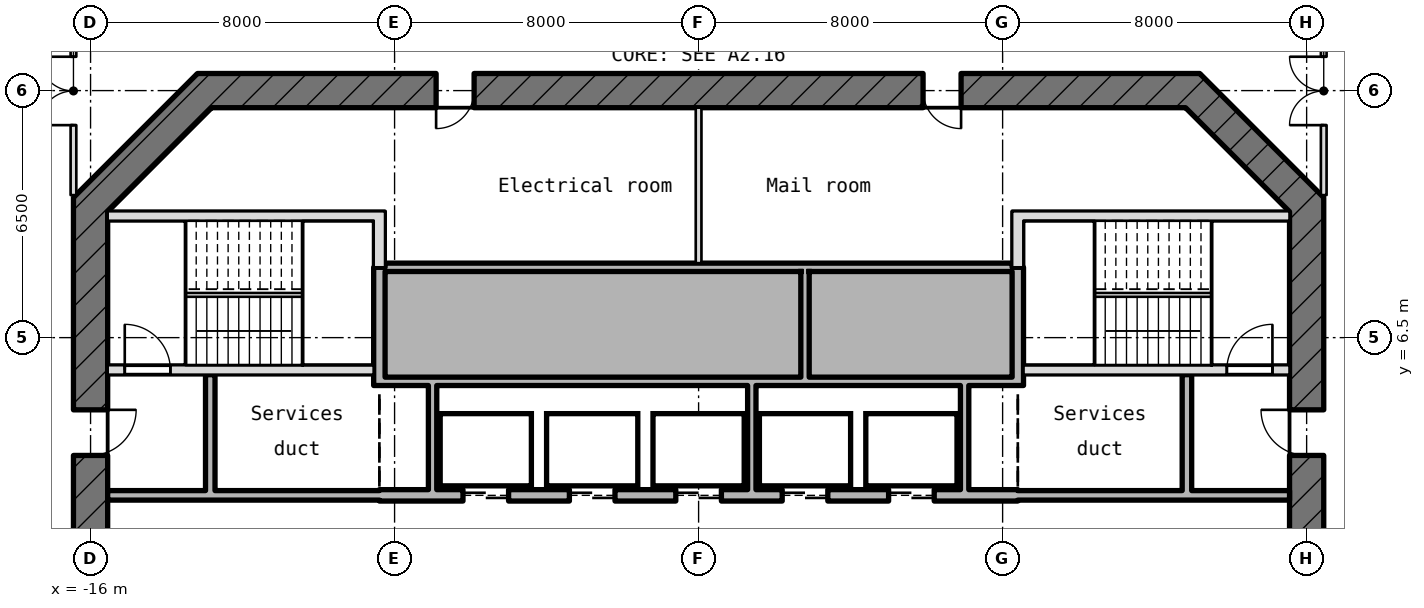
"""IFC4 building model, lengths in metres.
Left out: names, types, materials, properties, quantities, classifications, styles, units other than length and angle.
Written with IfcOpenShell. Run it as: python <this file> out.ifc"""

import sys

from ifc_helpers import new_model, si_unit, direction, frame, frame_2d, origin, place, context, subcontext, project, spatial, rectangle, extrude, element, fill, save


model = new_model("IFC4")
c1 = context("Model", 3, precision=1e-05, world=origin(), true_north=direction((0.0, 1.0)))
c2 = subcontext(c1, "Body", "Model", "MODEL_VIEW")
j1 = project(units=[si_unit("LENGTHUNIT", "METRE"), si_unit("PLANEANGLEUNIT", "RADIAN")], contexts=[c1])
p1 = place(None, origin())
s1 = spatial("IfcSite", under=j1, at=p1, CompositionType="ELEMENT")
p2 = place(p1, origin())
s2 = spatial("IfcBuilding", under=s1, at=p2, CompositionType="ELEMENT")
p3 = place(p2, frame((0.0, 0.0, 161.05)))
s3 = spatial("IfcBuildingStorey", under=s2, at=p3, CompositionType="ELEMENT", Elevation=161.05)
p4 = place(p3, frame((16.0, -10.186, -0.18), z_axis=(0.0, 0.0, 1.0), x_axis=(0.0, 1.0, 0.0)))
e1 = element("IfcWall", 1, at=p4, inside=s3, PredefinedType="SHEAR", context=c2, shape_type="SweptSolid", body=[
    extrude(rectangle(XDim=20.373, YDim=0.9, at=frame_2d((10.186, 0.0))), origin(), (0.0, 0.0, 1.0), 4.15),
])
p5 = place(p4, frame((8.986, 0.0, 0.18)))
e2 = element("IfcOpeningElement", 2, at=p5, cuts=e1, PredefinedType="OPENING", context=c2, shape_type="SweptSolid", body=[
    extrude(rectangle(XDim=2.4, YDim=2.1, at=frame_2d((1.2, 1.05))), frame((0.0, 0.46, 0.0), z_axis=(0.0, -1.0, 0.0), x_axis=(1.0, 0.0, 0.0)), (0.0, 0.0, 1.0), 0.92),
])
p6 = place(p4, frame((13.586, 0.0, 0.18)))
e3 = element("IfcOpeningElement", 3, at=p6, cuts=e1, PredefinedType="OPENING", context=c2, shape_type="SweptSolid", body=[
    extrude(rectangle(XDim=1.2, YDim=2.1, at=frame_2d((0.6, 1.05))), frame((0.0, 0.46, 0.0), z_axis=(0.0, -1.0, 0.0), x_axis=(1.0, 0.0, 0.0)), (0.0, 0.0, 1.0), 0.92),
])
p7 = place(p3, frame((16.132, 9.868, -0.18), z_axis=(0.0, 0.0, 1.0), x_axis=(-0.707106781187, 0.707106781187, 0.0)))
e4 = element("IfcWall", 4, at=p7, inside=s3, PredefinedType="SHEAR", context=c2, shape_type="SweptSolid", body=[
    extrude(rectangle(XDim=4.615, YDim=0.9, at=frame_2d((2.308, 0.0))), origin(), (0.0, 0.0, 1.0), 4.15),
])
p8 = place(p3, frame((13.186, 13.0, -0.18), z_axis=(0.0, 0.0, 1.0), x_axis=(-1.0, 0.0, 0.0)))
e5 = element("IfcWall", 5, at=p8, inside=s3, PredefinedType="SHEAR", context=c2, shape_type="SweptSolid", body=[
    extrude(rectangle(XDim=26.373, YDim=0.9, at=frame_2d((13.186, 0.0))), origin(), (0.0, 0.0, 1.0), 4.15),
])
p9 = place(p8, frame((19.094, 0.0, 0.18)))
e6 = element("IfcOpeningElement", 6, at=p9, cuts=e5, PredefinedType="OPENING", context=c2, shape_type="SweptSolid", body=[
    extrude(rectangle(XDim=1.0, YDim=2.1, at=frame_2d((0.5, 1.05))), frame((0.0, 0.46, 0.0), z_axis=(0.0, -1.0, 0.0), x_axis=(1.0, 0.0, 0.0)), (0.0, 0.0, 1.0), 0.92),
])
p10 = place(p8, frame((6.279, 0.0, 0.18)))
e7 = element("IfcOpeningElement", 7, at=p10, cuts=e5, PredefinedType="OPENING", context=c2, shape_type="SweptSolid", body=[
    extrude(rectangle(XDim=1.0, YDim=2.1, at=frame_2d((0.5, 1.05))), frame((0.0, 0.46, 0.0), z_axis=(0.0, -1.0, 0.0), x_axis=(1.0, 0.0, 0.0)), (0.0, 0.0, 1.0), 0.92),
])
p11 = place(p3, frame((-12.868, 13.132, -0.18), z_axis=(0.0, 0.0, 1.0), x_axis=(-0.707106781187, -0.707106781187, 0.0)))
e8 = element("IfcWall", 8, at=p11, inside=s3, PredefinedType="SHEAR", context=c2, shape_type="SweptSolid", body=[
    extrude(rectangle(XDim=4.615, YDim=0.9, at=frame_2d((2.308, 0.0))), origin(), (0.0, 0.0, 1.0), 4.15),
])
p12 = place(p3, frame((-16.0, 10.186, -0.18), z_axis=(0.0, 0.0, 1.0), x_axis=(0.0, -1.0, 0.0)))
e9 = element("IfcWall", 9, at=p12, inside=s3, PredefinedType="SHEAR", context=c2, shape_type="SweptSolid", body=[
    extrude(rectangle(XDim=20.373, YDim=0.9, at=frame_2d((10.186, 0.0))), origin(), (0.0, 0.0, 1.0), 4.15),
])
p13 = place(p12, frame((8.986, 0.0, 0.18)))
e10 = element("IfcOpeningElement", 10, at=p13, cuts=e9, PredefinedType="OPENING", context=c2, shape_type="SweptSolid", body=[
    extrude(rectangle(XDim=2.4, YDim=2.1, at=frame_2d((1.2, 1.05))), frame((0.0, 0.46, 0.0), z_axis=(0.0, -1.0, 0.0), x_axis=(1.0, 0.0, 0.0)), (0.0, 0.0, 1.0), 0.92),
])
p14 = place(p12, frame((5.586, 0.0, 0.18)))
e11 = element("IfcOpeningElement", 11, at=p14, cuts=e9, PredefinedType="OPENING", context=c2, shape_type="SweptSolid", body=[
    extrude(rectangle(XDim=1.2, YDim=2.1, at=frame_2d((0.6, 1.05))), frame((0.0, 0.46, 0.0), z_axis=(0.0, -1.0, 0.0), x_axis=(1.0, 0.0, 0.0)), (0.0, 0.0, 1.0), 0.92),
])
p15 = place(p3, frame((-15.55, 2.35, 0.0), z_axis=(0.0, 0.0, 1.0), x_axis=(1.0, 0.0, 0.0)))
e12 = element("IfcWall", 12, at=p15, inside=s3, PredefinedType="STANDARD", context=c2, shape_type="SweptSolid", body=[
    extrude(rectangle(XDim=7.15, YDim=0.25, at=frame_2d((3.575, 0.0))), origin(), (0.0, 0.0, 1.0), 3.97),
])
p16 = place(p3, frame((-8.4, 2.35, -0.18), z_axis=(0.0, 0.0, 1.0), x_axis=(1.0, 0.0, 0.0)))
e13 = element("IfcWall", 13, at=p16, inside=s3, PredefinedType="SHEAR", context=c2, shape_type="SweptSolid", body=[
    extrude(rectangle(XDim=16.8, YDim=0.3, at=frame_2d((8.4, 0.0))), origin(), (0.0, 0.0, 1.0), 4.15),
])
p17 = place(p16, frame((2.2, 0.0, 0.18)))
e14 = element("IfcOpeningElement", 14, at=p17, cuts=e13, PredefinedType="OPENING", context=c2, shape_type="SweptSolid", body=[
    extrude(rectangle(XDim=1.2, YDim=2.1, at=frame_2d((0.6, 1.05))), frame((0.0, 0.16, 0.0), z_axis=(0.0, -1.0, 0.0), x_axis=(1.0, 0.0, 0.0)), (0.0, 0.0, 1.0), 0.32),
])
p18 = place(p16, frame((5.0, 0.0, 0.18)))
e15 = element("IfcOpeningElement", 15, at=p18, cuts=e13, PredefinedType="OPENING", context=c2, shape_type="SweptSolid", body=[
    extrude(rectangle(XDim=1.2, YDim=2.1, at=frame_2d((0.6, 1.05))), frame((0.0, 0.16, 0.0), z_axis=(0.0, -1.0, 0.0), x_axis=(1.0, 0.0, 0.0)), (0.0, 0.0, 1.0), 0.32),
])
p19 = place(p16, frame((7.8, 0.0, 0.18)))
e16 = element("IfcOpeningElement", 16, at=p19, cuts=e13, PredefinedType="OPENING", context=c2, shape_type="SweptSolid", body=[
    extrude(rectangle(XDim=1.2, YDim=2.1, at=frame_2d((0.6, 1.05))), frame((0.0, 0.16, 0.0), z_axis=(0.0, -1.0, 0.0), x_axis=(1.0, 0.0, 0.0)), (0.0, 0.0, 1.0), 0.32),
])
p20 = place(p16, frame((10.6, 0.0, 0.18)))
e17 = element("IfcOpeningElement", 17, at=p20, cuts=e13, PredefinedType="OPENING", context=c2, shape_type="SweptSolid", body=[
    extrude(rectangle(XDim=1.2, YDim=2.1, at=frame_2d((0.6, 1.05))), frame((0.0, 0.16, 0.0), z_axis=(0.0, -1.0, 0.0), x_axis=(1.0, 0.0, 0.0)), (0.0, 0.0, 1.0), 0.32),
])
p21 = place(p16, frame((13.4, 0.0, 0.18)))
e18 = element("IfcOpeningElement", 18, at=p21, cuts=e13, PredefinedType="OPENING", context=c2, shape_type="SweptSolid", body=[
    extrude(rectangle(XDim=1.2, YDim=2.1, at=frame_2d((0.6, 1.05))), frame((0.0, 0.16, 0.0), z_axis=(0.0, -1.0, 0.0), x_axis=(1.0, 0.0, 0.0)), (0.0, 0.0, 1.0), 0.32),
])
p22 = place(p3, frame((8.4, 2.35, 0.0), z_axis=(0.0, 0.0, 1.0), x_axis=(1.0, 0.0, 0.0)))
e19 = element("IfcWall", 19, at=p22, inside=s3, PredefinedType="STANDARD", context=c2, shape_type="SweptSolid", body=[
    extrude(rectangle(XDim=7.15, YDim=0.25, at=frame_2d((3.575, 0.0))), origin(), (0.0, 0.0, 1.0), 3.97),
])
p23 = place(p3, frame((-8.25, 5.35, 0.0), z_axis=(0.0, 0.0, 1.0), x_axis=(1.0, 0.0, 0.0)))
e20 = element("IfcWall", 20, at=p23, inside=s3, PredefinedType="STANDARD", context=c2, shape_type="SweptSolid", body=[
    extrude(rectangle(XDim=16.5, YDim=0.22, at=frame_2d((8.25, 0.0))), origin(), (0.0, 0.0, 1.0), 3.97),
])
p24 = place(p3, frame((-15.55, 5.65, -0.18), z_axis=(0.0, 0.0, 1.0), x_axis=(1.0, 0.0, 0.0)))
e21 = element("IfcWall", 21, at=p24, inside=s3, PredefinedType="SHEAR", context=c2, shape_type="SweptSolid", body=[
    extrude(rectangle(XDim=7.0, YDim=0.25, at=frame_2d((3.5, 0.0))), origin(), (0.0, 0.0, 1.0), 4.15),
])
p25 = place(p24, frame((0.45, 0.0, 0.18)))
e22 = element("IfcOpeningElement", 22, at=p25, cuts=e21, PredefinedType="OPENING", context=c2, shape_type="SweptSolid", body=[
    extrude(rectangle(XDim=1.2, YDim=2.1, at=frame_2d((0.6, 1.05))), frame((0.0, 0.135, 0.0), z_axis=(0.0, -1.0, 0.0), x_axis=(1.0, 0.0, 0.0)), (0.0, 0.0, 1.0), 0.27),
])
p26 = place(p3, frame((8.55, 5.65, -0.18), z_axis=(0.0, 0.0, 1.0), x_axis=(1.0, 0.0, 0.0)))
e23 = element("IfcWall", 23, at=p26, inside=s3, PredefinedType="SHEAR", context=c2, shape_type="SweptSolid", body=[
    extrude(rectangle(XDim=7.0, YDim=0.25, at=frame_2d((3.5, 0.0))), origin(), (0.0, 0.0, 1.0), 4.15),
])
p27 = place(p26, frame((5.35, 0.0, 0.18)))
e24 = element("IfcOpeningElement", 24, at=p27, cuts=e23, PredefinedType="OPENING", context=c2, shape_type="SweptSolid", body=[
    extrude(rectangle(XDim=1.2, YDim=2.1, at=frame_2d((0.6, 1.05))), frame((0.0, 0.135, 0.0), z_axis=(0.0, -1.0, 0.0), x_axis=(1.0, 0.0, 0.0)), (0.0, 0.0, 1.0), 0.27),
])
p28 = place(p3, frame((-8.25, 8.35, 0.0), z_axis=(0.0, 0.0, 1.0), x_axis=(1.0, 0.0, 0.0)))
e25 = element("IfcWall", 25, at=p28, inside=s3, PredefinedType="STANDARD", context=c2, shape_type="SweptSolid", body=[
    extrude(rectangle(XDim=16.5, YDim=0.22, at=frame_2d((8.25, 0.0))), origin(), (0.0, 0.0, 1.0), 3.97),
])
for number, where, z_axis, x_axis in (
    (26, (-15.55, 9.7, -0.18), (0.0, 0.0, 1.0), (1.0, 0.0, 0.0)),
    (27, (8.55, 9.7, -0.18), (0.0, 0.0, 1.0), (1.0, 0.0, 0.0)),
):
    element("IfcWall", number, at=place(p3, frame(where, z_axis=z_axis, x_axis=x_axis)), inside=s3, PredefinedType="SHEAR", context=c2, shape_type="SweptSolid", body=[
        extrude(rectangle(XDim=7.0, YDim=0.25, at=frame_2d((3.5, 0.0))), origin(), (0.0, 0.0, 1.0), 4.15),
    ])
p29 = place(p3, frame((-12.85, 2.475, 0.0), z_axis=(0.0, 0.0, 1.0), x_axis=(0.0, 1.0, 0.0)))
e28 = element("IfcWall", 28, at=p29, inside=s3, PredefinedType="STANDARD", context=c2, shape_type="SweptSolid", body=[
    extrude(rectangle(XDim=3.05, YDim=0.25, at=frame_2d((1.525, 0.0))), origin(), (0.0, 0.0, 1.0), 3.97),
])
p30 = place(p3, frame((-8.4, 5.24, -0.18), z_axis=(0.0, 0.0, 1.0), x_axis=(0.0, 1.0, 0.0)))
e29 = element("IfcWall", 29, at=p30, inside=s3, PredefinedType="SHEAR", context=c2, shape_type="SweptSolid", body=[
    extrude(rectangle(XDim=3.11, YDim=0.3, at=frame_2d((1.555, 0.0))), origin(), (0.0, 0.0, 1.0), 4.15),
])
p31 = place(p3, frame((-8.4, 8.35, -0.18), z_axis=(0.0, 0.0, 1.0), x_axis=(0.0, 1.0, 0.0)))
e30 = element("IfcWall", 30, at=p31, inside=s3, PredefinedType="SHEAR", context=c2, shape_type="SweptSolid", body=[
    extrude(rectangle(XDim=1.475, YDim=0.3, at=frame_2d((0.737, 0.0))), origin(), (0.0, 0.0, 1.0), 4.15),
])
p32 = place(p3, frame((-7.0, 2.5, 0.0), z_axis=(0.0, 0.0, 1.0), x_axis=(0.0, 1.0, 0.0)))
e31 = element("IfcWall", 31, at=p32, inside=s3, PredefinedType="STANDARD", context=c2, shape_type="SweptSolid", body=[
    extrude(rectangle(XDim=2.74, YDim=0.22, at=frame_2d((1.37, 0.0))), origin(), (0.0, 0.0, 1.0), 3.97),
])
p33 = place(p3, frame((0.0, 8.46, 0.0), z_axis=(0.0, 0.0, 1.0), x_axis=(0.0, 1.0, 0.0)))
e32 = element("IfcWall", 32, at=p33, inside=s3, PredefinedType="PARTITIONING", context=c2, shape_type="SweptSolid", body=[
    extrude(rectangle(XDim=4.09, YDim=0.15, at=frame_2d((2.045, 0.0))), origin(), (0.0, 0.0, 1.0), 3.97),
])
p34 = place(p3, frame((1.4, 2.5, 0.0), z_axis=(0.0, 0.0, 1.0), x_axis=(0.0, 1.0, 0.0)))
e33 = element("IfcWall", 33, at=p34, inside=s3, PredefinedType="STANDARD", context=c2, shape_type="SweptSolid", body=[
    extrude(rectangle(XDim=2.74, YDim=0.22, at=frame_2d((1.37, 0.0))), origin(), (0.0, 0.0, 1.0), 3.97),
])
p35 = place(p3, frame((2.8, 5.46, 0.0), z_axis=(0.0, 0.0, 1.0), x_axis=(0.0, 1.0, 0.0)))
e34 = element("IfcWall", 34, at=p35, inside=s3, PredefinedType="STANDARD", context=c2, shape_type="SweptSolid", body=[
    extrude(rectangle(XDim=2.78, YDim=0.22, at=frame_2d((1.39, 0.0))), origin(), (0.0, 0.0, 1.0), 3.97),
])
p36 = place(p3, frame((7.0, 2.5, 0.0), z_axis=(0.0, 0.0, 1.0), x_axis=(0.0, 1.0, 0.0)))
e35 = element("IfcWall", 35, at=p36, inside=s3, PredefinedType="STANDARD", context=c2, shape_type="SweptSolid", body=[
    extrude(rectangle(XDim=2.74, YDim=0.22, at=frame_2d((1.37, 0.0))), origin(), (0.0, 0.0, 1.0), 3.97),
])
p37 = place(p3, frame((8.4, 5.24, -0.18), z_axis=(0.0, 0.0, 1.0), x_axis=(0.0, 1.0, 0.0)))
e36 = element("IfcWall", 36, at=p37, inside=s3, PredefinedType="SHEAR", context=c2, shape_type="SweptSolid", body=[
    extrude(rectangle(XDim=3.11, YDim=0.3, at=frame_2d((1.555, 0.0))), origin(), (0.0, 0.0, 1.0), 4.15),
])
p38 = place(p3, frame((8.4, 8.35, -0.18), z_axis=(0.0, 0.0, 1.0), x_axis=(0.0, 1.0, 0.0)))
e37 = element("IfcWall", 37, at=p38, inside=s3, PredefinedType="SHEAR", context=c2, shape_type="SweptSolid", body=[
    extrude(rectangle(XDim=1.475, YDim=0.3, at=frame_2d((0.737, 0.0))), origin(), (0.0, 0.0, 1.0), 4.15),
])
p39 = place(p3, frame((12.85, 2.475, 0.0), z_axis=(0.0, 0.0, 1.0), x_axis=(0.0, 1.0, 0.0)))
e38 = element("IfcWall", 38, at=p39, inside=s3, PredefinedType="STANDARD", context=c2, shape_type="SweptSolid", body=[
    extrude(rectangle(XDim=3.05, YDim=0.25, at=frame_2d((1.525, 0.0))), origin(), (0.0, 0.0, 1.0), 3.97),
])
p40 = place(p3, frame((-16.45, 10.25, 0.0), z_axis=(0.0, 0.0, 1.0), x_axis=(0.0, 1.0, 0.0)))
e39 = element("IfcWall", 39, at=p40, inside=s3, PredefinedType="PARTITIONING", context=c2, shape_type="SweptSolid", body=[
    extrude(rectangle(XDim=6.654, YDim=0.15, at=frame_2d((3.327, 0.0))), origin(), (0.0, 0.0, 1.0), 3.97),
])
p41 = place(p40, frame((1.841, 0.0, 0.0)))
e40 = element("IfcOpeningElement", 40, at=p41, cuts=e39, PredefinedType="OPENING", context=c2, shape_type="SweptSolid", body=[
    extrude(rectangle(XDim=1.8, YDim=2.1, at=frame_2d((0.9, 1.05))), frame((0.0, 0.085, 0.0), z_axis=(0.0, -1.0, 0.0), x_axis=(1.0, 0.0, 0.0)), (0.0, 0.0, 1.0), 0.17),
])
p42 = place(p3, frame((16.45, 10.25, 0.0), z_axis=(0.0, 0.0, 1.0), x_axis=(0.0, 1.0, 0.0)))
e41 = element("IfcWall", 41, at=p42, inside=s3, PredefinedType="PARTITIONING", context=c2, shape_type="SweptSolid", body=[
    extrude(rectangle(XDim=6.654, YDim=0.15, at=frame_2d((3.327, 0.0))), origin(), (0.0, 0.0, 1.0), 3.97),
])
p43 = place(p42, frame((1.841, 0.0, 0.0)))
e42 = element("IfcOpeningElement", 42, at=p43, cuts=e41, PredefinedType="OPENING", context=c2, shape_type="SweptSolid", body=[
    extrude(rectangle(XDim=1.8, YDim=2.1, at=frame_2d((0.9, 1.05))), frame((0.0, 0.085, 0.0), z_axis=(0.0, -1.0, 0.0), x_axis=(1.0, 0.0, 0.0)), (0.0, 0.0, 1.0), 0.17),
])
p44 = place(p3, frame((24.206, 13.502, 0.0), z_axis=(0.0, 0.0, 1.0), x_axis=(-0.863538195042, 0.504283437864, 0.0)))
e43 = element("IfcWall", 43, at=p44, inside=s3, PredefinedType="PARTITIONING", context=c2, shape_type="SweptSolid", body=[
    extrude(rectangle(XDim=22.633, YDim=0.12, at=frame_2d((11.317, 0.0))), origin(), (0.0, 0.0, 1.0), 3.97),
])
p45 = place(p17, origin())
e44 = element("IfcDoor", 44, at=p45, inside=s3, OperationType="DOUBLE_DOOR_SLIDING", PredefinedType="DOOR", context=c2, shape_type="SweptSolid", body=[
    extrude(rectangle(XDim=1.2, YDim=2.1, at=frame_2d((0.6, 1.05))), frame((0.0, 0.025, 0.0), z_axis=(0.0, -1.0, 0.0), x_axis=(1.0, 0.0, 0.0)), (0.0, 0.0, 1.0), 0.05),
])
fill(e14, e44)
p46 = place(p18, origin())
e45 = element("IfcDoor", 45, at=p46, inside=s3, OperationType="DOUBLE_DOOR_SLIDING", PredefinedType="DOOR", context=c2, shape_type="SweptSolid", body=[
    extrude(rectangle(XDim=1.2, YDim=2.1, at=frame_2d((0.6, 1.05))), frame((0.0, 0.025, 0.0), z_axis=(0.0, -1.0, 0.0), x_axis=(1.0, 0.0, 0.0)), (0.0, 0.0, 1.0), 0.05),
])
fill(e15, e45)
p47 = place(p19, origin())
e46 = element("IfcDoor", 46, at=p47, inside=s3, OperationType="DOUBLE_DOOR_SLIDING", PredefinedType="DOOR", context=c2, shape_type="SweptSolid", body=[
    extrude(rectangle(XDim=1.2, YDim=2.1, at=frame_2d((0.6, 1.05))), frame((0.0, 0.025, 0.0), z_axis=(0.0, -1.0, 0.0), x_axis=(1.0, 0.0, 0.0)), (0.0, 0.0, 1.0), 0.05),
])
fill(e16, e46)
p48 = place(p20, origin())
e47 = element("IfcDoor", 47, at=p48, inside=s3, OperationType="DOUBLE_DOOR_SLIDING", PredefinedType="DOOR", context=c2, shape_type="SweptSolid", body=[
    extrude(rectangle(XDim=1.2, YDim=2.1, at=frame_2d((0.6, 1.05))), frame((0.0, 0.025, 0.0), z_axis=(0.0, -1.0, 0.0), x_axis=(1.0, 0.0, 0.0)), (0.0, 0.0, 1.0), 0.05),
])
fill(e17, e47)
p49 = place(p21, origin())
e48 = element("IfcDoor", 48, at=p49, inside=s3, OperationType="DOUBLE_DOOR_SLIDING", PredefinedType="DOOR", context=c2, shape_type="SweptSolid", body=[
    extrude(rectangle(XDim=1.2, YDim=2.1, at=frame_2d((0.6, 1.05))), frame((0.0, 0.025, 0.0), z_axis=(0.0, -1.0, 0.0), x_axis=(1.0, 0.0, 0.0)), (0.0, 0.0, 1.0), 0.05),
])
fill(e18, e48)
p50 = place(p25, origin())
e49 = element("IfcDoor", 49, at=p50, inside=s3, OperationType="SINGLE_SWING_RIGHT", PredefinedType="DOOR", context=c2, shape_type="SweptSolid", body=[
    extrude(rectangle(XDim=1.2, YDim=2.1, at=frame_2d((0.6, 1.05))), frame((0.0, 0.025, 0.0), z_axis=(0.0, -1.0, 0.0), x_axis=(1.0, 0.0, 0.0)), (0.0, 0.0, 1.0), 0.05),
])
fill(e22, e49)
p51 = place(p27, origin())
e50 = element("IfcDoor", 50, at=p51, inside=s3, OperationType="SINGLE_SWING_RIGHT", PredefinedType="DOOR", context=c2, shape_type="SweptSolid", body=[
    extrude(rectangle(XDim=1.2, YDim=2.1, at=frame_2d((0.6, 1.05))), frame((0.0, 0.025, 0.0), z_axis=(0.0, -1.0, 0.0), x_axis=(1.0, 0.0, 0.0)), (0.0, 0.0, 1.0), 0.05),
])
fill(e24, e50)
p52 = place(p14, origin())
e51 = element("IfcDoor", 51, at=p52, inside=s3, OperationType="SINGLE_SWING_RIGHT", PredefinedType="DOOR", context=c2, shape_type="SweptSolid", body=[
    extrude(rectangle(XDim=1.2, YDim=2.1, at=frame_2d((0.6, 1.05))), frame((0.0, 0.025, 0.0), z_axis=(0.0, -1.0, 0.0), x_axis=(1.0, 0.0, 0.0)), (0.0, 0.0, 1.0), 0.05),
])
fill(e11, e51)
p53 = place(p6, origin())
e52 = element("IfcDoor", 52, at=p53, inside=s3, OperationType="SINGLE_SWING_RIGHT", PredefinedType="DOOR", context=c2, shape_type="SweptSolid", body=[
    extrude(rectangle(XDim=1.2, YDim=2.1, at=frame_2d((0.6, 1.05))), frame((0.0, 0.025, 0.0), z_axis=(0.0, -1.0, 0.0), x_axis=(1.0, 0.0, 0.0)), (0.0, 0.0, 1.0), 0.05),
])
fill(e3, e52)
p54 = place(p9, origin())
e53 = element("IfcDoor", 53, at=p54, inside=s3, OperationType="SINGLE_SWING_RIGHT", PredefinedType="DOOR", context=c2, shape_type="SweptSolid", body=[
    extrude(rectangle(XDim=1.0, YDim=2.1, at=frame_2d((0.5, 1.05))), frame((0.0, 0.025, 0.0), z_axis=(0.0, -1.0, 0.0), x_axis=(1.0, 0.0, 0.0)), (0.0, 0.0, 1.0), 0.05),
])
fill(e6, e53)
p55 = place(p10, origin())
e54 = element("IfcDoor", 54, at=p55, inside=s3, OperationType="SINGLE_SWING_RIGHT", PredefinedType="DOOR", context=c2, shape_type="SweptSolid", body=[
    extrude(rectangle(XDim=1.0, YDim=2.1, at=frame_2d((0.5, 1.05))), frame((0.0, 0.025, 0.0), z_axis=(0.0, -1.0, 0.0), x_axis=(1.0, 0.0, 0.0)), (0.0, 0.0, 1.0), 0.05),
])
fill(e7, e54)
p56 = place(p41, origin())
e55 = element("IfcDoor", 55, at=p56, inside=s3, OperationType="DOUBLE_DOOR_SINGLE_SWING", PredefinedType="DOOR", context=c2, shape_type="SweptSolid", body=[
    extrude(rectangle(XDim=1.8, YDim=2.1, at=frame_2d((0.9, 1.05))), frame((0.0, 0.025, 0.0), z_axis=(0.0, -1.0, 0.0), x_axis=(1.0, 0.0, 0.0)), (0.0, 0.0, 1.0), 0.05),
])
fill(e40, e55)
p57 = place(p43, origin())
e56 = element("IfcDoor", 56, at=p57, inside=s3, OperationType="DOUBLE_DOOR_SINGLE_SWING", PredefinedType="DOOR", context=c2, shape_type="SweptSolid", body=[
    extrude(rectangle(XDim=1.8, YDim=2.1, at=frame_2d((0.9, 1.05))), frame((0.0, 0.025, 0.0), z_axis=(0.0, -1.0, 0.0), x_axis=(1.0, 0.0, 0.0)), (0.0, 0.0, 1.0), 0.05),
])
fill(e42, e56)
save(model, sys.argv[1])
